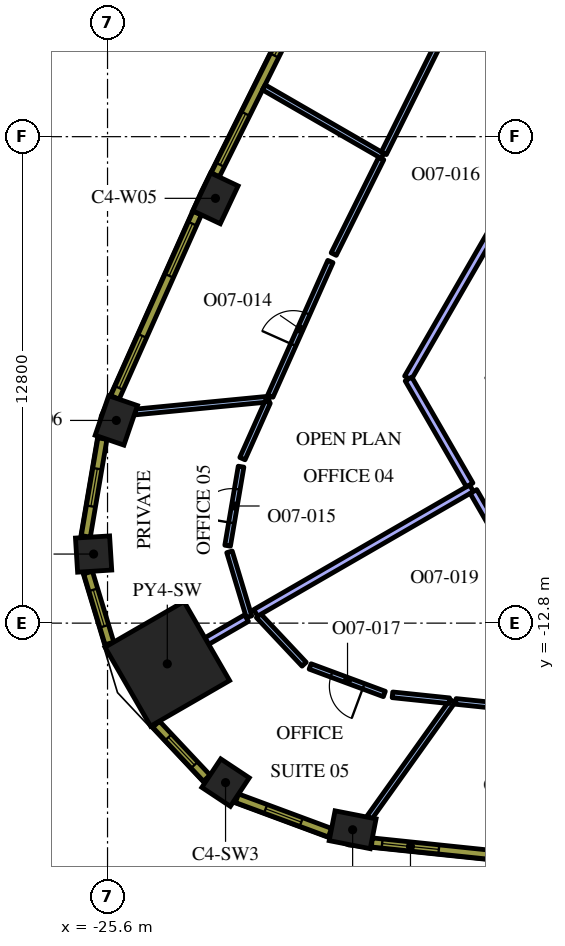
"""IFC4 building model, lengths in metres.
Left out: names, types, materials, properties, quantities, classifications, styles, units other than length and angle.
Written with IfcOpenShell. Run it as: python <this file> out.ifc"""

import sys

from ifc_helpers import new_model, si_unit, direction, frame, frame_2d, origin, origin_2d, place, context, subcontext, project, spatial, rectangle, extrude, element, fill, save


model = new_model("IFC4")
c1 = context("Model", 3, precision=1e-05, world=origin(), true_north=direction((0.0, 1.0)))
c2 = subcontext(c1, "Body", "Model", "MODEL_VIEW")
j1 = project(units=[si_unit("LENGTHUNIT", "METRE"), si_unit("PLANEANGLEUNIT", "RADIAN")], contexts=[c1])
p1 = place(None, origin())
s1 = spatial("IfcSite", under=j1, at=p1, CompositionType="ELEMENT")
p2 = place(p1, origin())
s2 = spatial("IfcBuilding", under=s1, at=p2, CompositionType="ELEMENT")
p3 = place(p2, frame((0.0, 0.0, 222.6)))
s3 = spatial("IfcBuildingStorey", under=s2, at=p3, CompositionType="ELEMENT", Elevation=222.6)
p4 = place(p3, frame((-24.027, -13.872, 0.0), z_axis=(0.0, 0.0, 1.0), x_axis=(-0.866025403784, -0.5, 0.0)))
e1 = element("IfcColumn", 1, at=p4, inside=s3, PredefinedType="COLUMN", context=c2, shape_type="SweptSolid", body=[
    extrude(rectangle(XDim=2.4, YDim=2.4, at=origin_2d()), origin(), (0.0, 0.0, 1.0), 4.2),
])
for number, where, z_axis, x_axis in (
    (2, (-19.15, -18.237, 0.0), (0.0, 0.0, 1.0), (0.981, -0.192, 0.0)),
    (3, (-22.76, -1.623, 0.0), (0.0, 0.0, 1.0), (-0.426, -0.905, 0.0)),
    (4, (-25.369, -7.466, 0.0), (0.0, 0.0, 1.0), (-0.324, -0.946, 0.0)),
):
    element("IfcColumn", number, at=place(p3, frame(where, z_axis=z_axis, x_axis=x_axis)), inside=s3, PredefinedType="COLUMN", context=c2, shape_type="SweptSolid", body=[
        extrude(rectangle(XDim=1.1, YDim=0.8, at=origin_2d()), origin(), (0.0, 0.0, 1.0), 4.2),
    ])
for number, where, z_axis, x_axis in (
    (5, (-25.967, -10.982, 0.0), (0.0, 0.0, 1.0), (0.062, -0.998, 0.0)),
    (6, (-22.494, -16.997, 0.0), (0.0, 0.0, 1.0), (0.833, -0.553, 0.0)),
):
    element("IfcColumn", number, at=place(p3, frame(where, z_axis=z_axis, x_axis=x_axis)), inside=s3, PredefinedType="COLUMN", context=c2, shape_type="SweptSolid", body=[
        extrude(rectangle(XDim=0.9, YDim=0.9, at=origin_2d()), origin(), (0.0, 0.0, 1.0), 4.2),
    ])
p5 = place(p3, frame((-18.363, -0.506, 0.0), z_axis=(0.0, 0.0, 1.0), x_axis=(-0.866048087663, 0.499960708312, 0.0)))
e7 = element("IfcWall", 7, at=p5, inside=s3, PredefinedType="PARTITIONING", context=c2, shape_type="SweptSolid", body=[
    extrude(rectangle(XDim=3.607, YDim=0.15, at=frame_2d((1.804, 0.0))), origin(), (0.0, 0.0, 1.0), 3.45),
])
p6 = place(p3, frame((-16.958, 2.321, 0.0), z_axis=(0.0, 0.0, 1.0), x_axis=(-0.445184199442, -0.895439014432, 0.0)))
e8 = element("IfcWall", 8, at=p6, inside=s3, PredefinedType="PARTITIONING", context=c2, shape_type="SweptSolid", body=[
    extrude(rectangle(XDim=3.082, YDim=0.15, at=frame_2d((1.541, 0.0))), origin(), (0.0, 0.0, 1.0), 3.45),
])
p7 = place(p3, frame((-21.351, -6.904, 0.0), z_axis=(0.0, 0.0, 1.0), x_axis=(-0.995356631468, -0.096255785242, 0.0)))
e9 = element("IfcWall", 9, at=p7, inside=s3, PredefinedType="PARTITIONING", context=c2, shape_type="SweptSolid", body=[
    extrude(rectangle(XDim=3.536, YDim=0.15, at=frame_2d((1.768, 0.0))), origin(), (0.0, 0.0, 1.0), 3.45),
])
p8 = place(p3, frame((-18.397, -0.573, 0.0), z_axis=(0.0, 0.0, 1.0), x_axis=(-0.445162501923, -0.89544980143, 0.0)))
e10 = element("IfcWall", 10, at=p8, inside=s3, PredefinedType="PARTITIONING", context=c2, shape_type="SweptSolid", body=[
    extrude(rectangle(XDim=2.811, YDim=0.15, at=frame_2d((1.405, 0.0))), origin(), (0.0, 0.0, 1.0), 3.45),
])
p9 = place(p3, frame((-21.316, -6.826, 0.0), z_axis=(0.0, 0.0, 1.0), x_axis=(0.407639588163, 0.913142905663, 0.0)))
e11 = element("IfcWall", 11, at=p9, inside=s3, PredefinedType="PARTITIONING", context=c2, shape_type="SweptSolid", body=[
    extrude(rectangle(XDim=3.877, YDim=0.15, at=frame_2d((1.938, 0.0))), origin(), (0.0, 0.0, 1.0), 3.45),
])
p10 = place(p9, frame((1.477, 0.0, 0.0)))
e12 = element("IfcOpeningElement", 12, at=p10, cuts=e11, PredefinedType="OPENING", context=c2, shape_type="SweptSolid", body=[
    extrude(rectangle(XDim=0.9, YDim=2.1, at=frame_2d((0.45, 1.05))), frame((0.0, 0.085, 0.0), z_axis=(0.0, -1.0, 0.0), x_axis=(1.0, 0.0, 0.0)), (0.0, 0.0, 1.0), 0.17),
])
p11 = place(p3, frame((-21.386, -6.983, 0.0), z_axis=(0.0, 0.0, 1.0), x_axis=(-0.407597309494, -0.91316177827, 0.0)))
e13 = element("IfcWall", 13, at=p11, inside=s3, PredefinedType="PARTITIONING", context=c2, shape_type="SweptSolid", body=[
    extrude(rectangle(XDim=1.63, YDim=0.15, at=frame_2d((0.815, 0.0))), origin(), (0.0, 0.0, 1.0), 3.45),
])
p12 = place(p3, frame((-22.44, -10.763, 0.0), z_axis=(0.0, 0.0, 1.0), x_axis=(0.167682096872, 0.985841120257, 0.0)))
e14 = element("IfcWall", 14, at=p12, inside=s3, PredefinedType="PARTITIONING", context=c2, shape_type="SweptSolid", body=[
    extrude(rectangle(XDim=2.11, YDim=0.15, at=frame_2d((1.055, 0.0))), origin(), (0.0, 0.0, 1.0), 3.45),
])
p13 = place(p12, frame((0.61, 0.0, 0.0)))
e15 = element("IfcOpeningElement", 15, at=p13, cuts=e14, PredefinedType="OPENING", context=c2, shape_type="SweptSolid", body=[
    extrude(rectangle(XDim=0.9, YDim=2.1, at=frame_2d((0.45, 1.05))), frame((0.0, 0.085, 0.0), z_axis=(0.0, -1.0, 0.0), x_axis=(1.0, 0.0, 0.0)), (0.0, 0.0, 1.0), 0.17),
])
p14 = place(p3, frame((-22.391, -10.924, 0.0), z_axis=(0.0, 0.0, 1.0), x_axis=(0.288642134652, -0.957437056993, 0.0)))
e16 = element("IfcWall", 16, at=p14, inside=s3, PredefinedType="PARTITIONING", context=c2, shape_type="SweptSolid", body=[
    extrude(rectangle(XDim=1.782, YDim=0.15, at=frame_2d((0.891, 0.0))), origin(), (0.0, 0.0, 1.0), 3.45),
])
p15 = place(p3, frame((-21.943, -12.669, 0.0), z_axis=(0.0, 0.0, 1.0), x_axis=(-0.866030586491, -0.499991023182, 0.0)))
e17 = element("IfcWall", 17, at=p15, inside=s3, PredefinedType="PARTITIONING", context=c2, shape_type="SweptSolid", body=[
    extrude(rectangle(XDim=1.207, YDim=0.2, at=frame_2d((0.603, 0.0))), origin(), (0.0, 0.0, 1.0), 3.45),
])
p16 = place(p3, frame((-16.021, -9.25, 0.0), z_axis=(0.0, 0.0, 1.0), x_axis=(-0.866021955858, -0.500005971936, 0.0)))
e18 = element("IfcWall", 18, at=p16, inside=s3, PredefinedType="PARTITIONING", context=c2, shape_type="SweptSolid", body=[
    extrude(rectangle(XDim=6.56, YDim=0.2, at=frame_2d((3.28, 0.0))), origin(), (0.0, 0.0, 1.0), 3.45),
])
p17 = place(p3, frame((-12.537, 2.585, 0.0), z_axis=(0.0, 0.0, 1.0), x_axis=(-0.500002393198, -0.866024022066, 0.0)))
e19 = element("IfcWall", 19, at=p17, inside=s3, PredefinedType="PARTITIONING", context=c2, shape_type="SweptSolid", body=[
    extrude(rectangle(XDim=10.317, YDim=0.2, at=frame_2d((5.159, 0.0))), origin(), (0.0, 0.0, 1.0), 3.45),
])
p18 = place(p17, frame((4.7, 0.0, 0.0)))
e20 = element("IfcOpeningElement", 20, at=p18, cuts=e19, PredefinedType="OPENING", context=c2, shape_type="SweptSolid", body=[
    extrude(rectangle(XDim=1.0, YDim=2.1, at=frame_2d((0.5, 1.05))), frame((0.0, 0.11, 0.0), z_axis=(0.0, -1.0, 0.0), x_axis=(1.0, 0.0, 0.0)), (0.0, 0.0, 1.0), 0.22),
])
p19 = place(p3, frame((-17.681, -6.376, 0.0), z_axis=(0.0, 0.0, 1.0), x_axis=(0.500022299258, -0.866012528919, 0.0)))
e21 = element("IfcWall", 21, at=p19, inside=s3, PredefinedType="PARTITIONING", context=c2, shape_type="SweptSolid", body=[
    extrude(rectangle(XDim=3.219, YDim=0.2, at=frame_2d((1.609, 0.0))), origin(), (0.0, 0.0, 1.0), 3.45),
])
p20 = place(p3, frame((-16.521, -14.851, 0.0), z_axis=(0.0, 0.0, 1.0), x_axis=(-0.58104805465, -0.813869251285, 0.0)))
e22 = element("IfcWall", 22, at=p20, inside=s3, PredefinedType="PARTITIONING", context=c2, shape_type="SweptSolid", body=[
    extrude(rectangle(XDim=3.766, YDim=0.15, at=frame_2d((1.883, 0.0))), origin(), (0.0, 0.0, 1.0), 3.45),
])
p21 = place(p3, frame((-21.628, -12.603, 0.0), z_axis=(0.0, 0.0, 1.0), x_axis=(0.684778496912, -0.728751267695, 0.0)))
e23 = element("IfcWall", 23, at=p21, inside=s3, PredefinedType="PARTITIONING", context=c2, shape_type="SweptSolid", body=[
    extrude(rectangle(XDim=1.754, YDim=0.15, at=frame_2d((0.877, 0.0))), origin(), (0.0, 0.0, 1.0), 3.45),
])
p22 = place(p3, frame((-18.316, -14.664, 0.0), z_axis=(0.0, 0.0, 1.0), x_axis=(-0.937594570401, 0.347730386297, 0.0)))
e24 = element("IfcWall", 24, at=p22, inside=s3, PredefinedType="PARTITIONING", context=c2, shape_type="SweptSolid", body=[
    extrude(rectangle(XDim=2.083, YDim=0.15, at=frame_2d((1.042, 0.0))), origin(), (0.0, 0.0, 1.0), 3.45),
])
p23 = place(p22, frame((0.583, 0.0, 0.0)))
e25 = element("IfcOpeningElement", 25, at=p23, cuts=e24, PredefinedType="OPENING", context=c2, shape_type="SweptSolid", body=[
    extrude(rectangle(XDim=0.9, YDim=2.1, at=frame_2d((0.45, 1.05))), frame((0.0, 0.085, 0.0), z_axis=(0.0, -1.0, 0.0), x_axis=(1.0, 0.0, 0.0)), (0.0, 0.0, 1.0), 0.17),
])
p24 = place(p3, frame((-18.103, -14.686, 0.0), z_axis=(0.0, 0.0, 1.0), x_axis=(0.994622241781, -0.103569281909, 0.0)))
e26 = element("IfcWall", 26, at=p24, inside=s3, PredefinedType="PARTITIONING", context=c2, shape_type="SweptSolid", body=[
    extrude(rectangle(XDim=1.504, YDim=0.15, at=frame_2d((0.752, 0.0))), origin(), (0.0, 0.0, 1.0), 3.45),
])
p25 = place(p3, frame((-12.823, -15.236, 0.0), z_axis=(0.0, 0.0, 1.0), x_axis=(-0.994621582944, 0.10357560882, 0.0)))
e27 = element("IfcWall", 27, at=p25, inside=s3, PredefinedType="PARTITIONING", context=c2, shape_type="SweptSolid", body=[
    extrude(rectangle(XDim=3.632, YDim=0.15, at=frame_2d((1.816, 0.0))), origin(), (0.0, 0.0, 1.0), 3.45),
])
p26 = place(p25, frame((1.332, 0.0, 0.0)))
e28 = element("IfcOpeningElement", 28, at=p26, cuts=e27, PredefinedType="OPENING", context=c2, shape_type="SweptSolid", body=[
    extrude(rectangle(XDim=0.9, YDim=2.1, at=frame_2d((0.45, 1.05))), frame((0.0, 0.085, 0.0), z_axis=(0.0, -1.0, 0.0), x_axis=(1.0, 0.0, 0.0)), (0.0, 0.0, 1.0), 0.17),
])
p27 = place(p3, frame((-15.971, -9.337, 0.0), z_axis=(0.0, 0.0, 1.0), x_axis=(0.500010870188, -0.866019127788, 0.0)))
e29 = element("IfcWall", 29, at=p27, inside=s3, PredefinedType="PARTITIONING", context=c2, shape_type="SweptSolid", body=[
    extrude(rectangle(XDim=3.249, YDim=0.2, at=frame_2d((1.624, 0.0))), origin(), (0.0, 0.0, 1.0), 3.45),
])
p28 = place(p27, frame((1.1, 0.0, 0.0)))
e30 = element("IfcOpeningElement", 30, at=p28, cuts=e29, PredefinedType="OPENING", context=c2, shape_type="SweptSolid", body=[
    extrude(rectangle(XDim=1.0, YDim=2.1, at=frame_2d((0.5, 1.05))), frame((0.0, 0.11, 0.0), z_axis=(0.0, -1.0, 0.0), x_axis=(1.0, 0.0, 0.0)), (0.0, 0.0, 1.0), 0.22),
])
p29 = place(p3, frame((-18.644, -18.571, 0.0), z_axis=(0.0, 0.0, 1.0), x_axis=(0.994621961215, -0.103571976272, 0.0)))
e31 = element("IfcWall", 31, at=p29, inside=s3, PredefinedType="SOLIDWALL", context=c2, shape_type="SweptSolid", body=[
    extrude(rectangle(XDim=5.311, YDim=0.24, at=frame_2d((2.655, 0.0))), origin(), (0.0, 0.0, 1.0), 3.95),
])
p30 = place(p29, frame((0.271, 0.0, 0.9)))
e32 = element("IfcOpeningElement", 32, at=p30, cuts=e31, PredefinedType="OPENING", context=c2, shape_type="SweptSolid", body=[
    extrude(rectangle(XDim=1.5, YDim=2.55, at=frame_2d((0.75, 1.275))), frame((0.0, 0.13, 0.0), z_axis=(0.0, -1.0, 0.0), x_axis=(1.0, 0.0, 0.0)), (0.0, 0.0, 1.0), 0.26),
])
p31 = place(p29, frame((3.504, 0.0, 0.9)))
e33 = element("IfcOpeningElement", 33, at=p31, cuts=e31, PredefinedType="OPENING", context=c2, shape_type="SweptSolid", body=[
    extrude(rectangle(XDim=1.5, YDim=2.55, at=frame_2d((0.75, 1.275))), frame((0.0, 0.13, 0.0), z_axis=(0.0, -1.0, 0.0), x_axis=(1.0, 0.0, 0.0)), (0.0, 0.0, 1.0), 0.26),
])
p32 = place(p3, frame((-20.407, 3.74, 0.0), z_axis=(0.0, 0.0, 1.0), x_axis=(-0.445129582031, -0.895466166419, 0.0)))
e34 = element("IfcWall", 34, at=p32, inside=s3, PredefinedType="SOLIDWALL", context=c2, shape_type="SweptSolid", body=[
    extrude(rectangle(XDim=5.298, YDim=0.24, at=frame_2d((2.649, 0.0))), origin(), (0.0, 0.0, 1.0), 3.95),
])
p33 = place(p32, frame((0.295, 0.0, 0.9)))
e35 = element("IfcOpeningElement", 35, at=p33, cuts=e34, PredefinedType="OPENING", context=c2, shape_type="SweptSolid", body=[
    extrude(rectangle(XDim=1.5, YDim=2.55, at=frame_2d((0.75, 1.275))), frame((0.0, 0.13, 0.0), z_axis=(0.0, -1.0, 0.0), x_axis=(1.0, 0.0, 0.0)), (0.0, 0.0, 1.0), 0.26),
])
p34 = place(p32, frame((3.504, 0.0, 0.9)))
e36 = element("IfcOpeningElement", 36, at=p34, cuts=e34, PredefinedType="OPENING", context=c2, shape_type="SweptSolid", body=[
    extrude(rectangle(XDim=1.5, YDim=2.55, at=frame_2d((0.75, 1.275))), frame((0.0, 0.13, 0.0), z_axis=(0.0, -1.0, 0.0), x_axis=(1.0, 0.0, 0.0)), (0.0, 0.0, 1.0), 0.26),
])
p35 = place(p3, frame((-23.24, -2.011, 0.0), z_axis=(0.0, 0.0, 1.0), x_axis=(-0.407579651789, -0.913169659728, 0.0)))
e37 = element("IfcWall", 37, at=p35, inside=s3, PredefinedType="SOLIDWALL", context=c2, shape_type="SweptSolid", body=[
    extrude(rectangle(XDim=5.311, YDim=0.24, at=frame_2d((2.655, 0.0))), origin(), (0.0, 0.0, 1.0), 3.95),
])
p36 = place(p35, frame((0.306, 0.0, 0.9)))
e38 = element("IfcOpeningElement", 38, at=p36, cuts=e37, PredefinedType="OPENING", context=c2, shape_type="SweptSolid", body=[
    extrude(rectangle(XDim=1.5, YDim=2.55, at=frame_2d((0.75, 1.275))), frame((0.0, 0.13, 0.0), z_axis=(0.0, -1.0, 0.0), x_axis=(1.0, 0.0, 0.0)), (0.0, 0.0, 1.0), 0.26),
])
p37 = place(p35, frame((3.539, 0.0, 0.9)))
e39 = element("IfcOpeningElement", 39, at=p37, cuts=e37, PredefinedType="OPENING", context=c2, shape_type="SweptSolid", body=[
    extrude(rectangle(XDim=1.5, YDim=2.55, at=frame_2d((0.75, 1.275))), frame((0.0, 0.13, 0.0), z_axis=(0.0, -1.0, 0.0), x_axis=(1.0, 0.0, 0.0)), (0.0, 0.0, 1.0), 0.26),
])
p38 = place(p3, frame((-25.734, -7.945, 0.0), z_axis=(0.0, 0.0, 1.0), x_axis=(-0.167660055546, -0.985844869021, 0.0)))
e40 = element("IfcWall", 40, at=p38, inside=s3, PredefinedType="SOLIDWALL", context=c2, shape_type="SweptSolid", body=[
    extrude(rectangle(XDim=2.609, YDim=0.24, at=frame_2d((1.305, 0.0))), origin(), (0.0, 0.0, 1.0), 3.95),
])
p39 = place(p38, frame((0.805, 0.0, 0.9)))
e41 = element("IfcOpeningElement", 41, at=p39, cuts=e40, PredefinedType="OPENING", context=c2, shape_type="SweptSolid", body=[
    extrude(rectangle(XDim=1.0, YDim=2.55, at=frame_2d((0.5, 1.275))), frame((0.0, 0.13, 0.0), z_axis=(0.0, -1.0, 0.0), x_axis=(1.0, 0.0, 0.0)), (0.0, 0.0, 1.0), 0.26),
])
p40 = place(p3, frame((-26.112, -11.469, 0.0), z_axis=(0.0, 0.0, 1.0), x_axis=(0.288727209095, -0.957411405159, 0.0)))
e42 = element("IfcWall", 42, at=p40, inside=s3, PredefinedType="SOLIDWALL", context=c2, shape_type="SweptSolid", body=[
    extrude(rectangle(XDim=1.948, YDim=0.24, at=frame_2d((0.974, 0.0))), origin(), (0.0, 0.0, 1.0), 3.95),
])
p41 = place(p40, frame((0.474, 0.0, 0.9)))
e43 = element("IfcOpeningElement", 43, at=p41, cuts=e42, PredefinedType="OPENING", context=c2, shape_type="SweptSolid", body=[
    extrude(rectangle(XDim=1.0, YDim=2.55, at=frame_2d((0.5, 1.275))), frame((0.0, 0.13, 0.0), z_axis=(0.0, -1.0, 0.0), x_axis=(1.0, 0.0, 0.0)), (0.0, 0.0, 1.0), 0.26),
])
p42 = place(p3, frame((-24.323, -15.459, 0.0), z_axis=(0.0, 0.0, 1.0), x_axis=(0.684770274166, -0.728758994194, 0.0)))
e44 = element("IfcWall", 44, at=p42, inside=s3, PredefinedType="SOLIDWALL", context=c2, shape_type="SweptSolid", body=[
    extrude(rectangle(XDim=1.948, YDim=0.24, at=frame_2d((0.974, 0.0))), origin(), (0.0, 0.0, 1.0), 3.95),
])
p43 = place(p42, frame((0.474, 0.0, 0.9)))
e45 = element("IfcOpeningElement", 45, at=p43, cuts=e44, PredefinedType="OPENING", context=c2, shape_type="SweptSolid", body=[
    extrude(rectangle(XDim=1.0, YDim=2.55, at=frame_2d((0.5, 1.275))), frame((0.0, 0.13, 0.0), z_axis=(0.0, -1.0, 0.0), x_axis=(1.0, 0.0, 0.0)), (0.0, 0.0, 1.0), 0.26),
])
p44 = place(p3, frame((-22.194, -17.406, 0.0), z_axis=(0.0, 0.0, 1.0), x_axis=(0.937569171184, -0.347798863203, 0.0)))
e46 = element("IfcWall", 46, at=p44, inside=s3, PredefinedType="SOLIDWALL", context=c2, shape_type="SweptSolid", body=[
    extrude(rectangle(XDim=2.609, YDim=0.24, at=frame_2d((1.305, 0.0))), origin(), (0.0, 0.0, 1.0), 3.95),
])
p45 = place(p44, frame((0.805, 0.0, 0.9)))
e47 = element("IfcOpeningElement", 47, at=p45, cuts=e46, PredefinedType="OPENING", context=c2, shape_type="SweptSolid", body=[
    extrude(rectangle(XDim=1.0, YDim=2.55, at=frame_2d((0.5, 1.275))), frame((0.0, 0.13, 0.0), z_axis=(0.0, -1.0, 0.0), x_axis=(1.0, 0.0, 0.0)), (0.0, 0.0, 1.0), 0.26),
])
p46 = place(p10, origin())
e48 = element("IfcDoor", 48, at=p46, inside=s3, OperationType="SINGLE_SWING_LEFT", PredefinedType="DOOR", context=c2, shape_type="SweptSolid", body=[
    extrude(rectangle(XDim=0.9, YDim=2.1, at=frame_2d((0.45, 1.05))), frame((0.0, 0.025, 0.0), z_axis=(0.0, -1.0, 0.0), x_axis=(1.0, 0.0, 0.0)), (0.0, 0.0, 1.0), 0.05),
])
fill(e12, e48)
p47 = place(p13, origin())
e49 = element("IfcDoor", 49, at=p47, inside=s3, OperationType="SINGLE_SWING_RIGHT", PredefinedType="DOOR", context=c2, shape_type="SweptSolid", body=[
    extrude(rectangle(XDim=0.9, YDim=2.1, at=frame_2d((0.45, 1.05))), frame((0.0, 0.025, 0.0), z_axis=(0.0, -1.0, 0.0), x_axis=(1.0, 0.0, 0.0)), (0.0, 0.0, 1.0), 0.05),
])
fill(e15, e49)
p48 = place(p23, origin())
e50 = element("IfcDoor", 50, at=p48, inside=s3, OperationType="SINGLE_SWING_LEFT", PredefinedType="DOOR", context=c2, shape_type="SweptSolid", body=[
    extrude(rectangle(XDim=0.9, YDim=2.1, at=frame_2d((0.45, 1.05))), frame((0.0, 0.025, 0.0), z_axis=(0.0, -1.0, 0.0), x_axis=(1.0, 0.0, 0.0)), (0.0, 0.0, 1.0), 0.05),
])
fill(e25, e50)
p49 = place(p30, origin())
e51 = element("IfcWindow", 51, at=p49, inside=s3, PartitioningType="SINGLE_PANEL", PredefinedType="WINDOW", context=c2, shape_type="SweptSolid", body=[
    extrude(rectangle(XDim=1.5, YDim=2.55, at=frame_2d((0.75, 1.275))), frame((0.0, 0.04, 0.0), z_axis=(0.0, -1.0, 0.0), x_axis=(1.0, 0.0, 0.0)), (0.0, 0.0, 1.0), 0.06),
])
fill(e32, e51)
p50 = place(p33, origin())
e52 = element("IfcWindow", 52, at=p50, inside=s3, PartitioningType="SINGLE_PANEL", PredefinedType="WINDOW", context=c2, shape_type="SweptSolid", body=[
    extrude(rectangle(XDim=1.5, YDim=2.55, at=frame_2d((0.75, 1.275))), frame((0.0, 0.04, 0.0), z_axis=(0.0, -1.0, 0.0), x_axis=(1.0, 0.0, 0.0)), (0.0, 0.0, 1.0), 0.06),
])
fill(e35, e52)
p51 = place(p34, origin())
e53 = element("IfcWindow", 53, at=p51, inside=s3, PartitioningType="SINGLE_PANEL", PredefinedType="WINDOW", context=c2, shape_type="SweptSolid", body=[
    extrude(rectangle(XDim=1.5, YDim=2.55, at=frame_2d((0.75, 1.275))), frame((0.0, 0.04, 0.0), z_axis=(0.0, -1.0, 0.0), x_axis=(1.0, 0.0, 0.0)), (0.0, 0.0, 1.0), 0.06),
])
fill(e36, e53)
p52 = place(p36, origin())
e54 = element("IfcWindow", 54, at=p52, inside=s3, PartitioningType="SINGLE_PANEL", PredefinedType="WINDOW", context=c2, shape_type="SweptSolid", body=[
    extrude(rectangle(XDim=1.5, YDim=2.55, at=frame_2d((0.75, 1.275))), frame((0.0, 0.04, 0.0), z_axis=(0.0, -1.0, 0.0), x_axis=(1.0, 0.0, 0.0)), (0.0, 0.0, 1.0), 0.06),
])
fill(e38, e54)
p53 = place(p37, origin())
e55 = element("IfcWindow", 55, at=p53, inside=s3, PartitioningType="SINGLE_PANEL", PredefinedType="WINDOW", context=c2, shape_type="SweptSolid", body=[
    extrude(rectangle(XDim=1.5, YDim=2.55, at=frame_2d((0.75, 1.275))), frame((0.0, 0.04, 0.0), z_axis=(0.0, -1.0, 0.0), x_axis=(1.0, 0.0, 0.0)), (0.0, 0.0, 1.0), 0.06),
])
fill(e39, e55)
p54 = place(p39, origin())
e56 = element("IfcWindow", 56, at=p54, inside=s3, PartitioningType="SINGLE_PANEL", PredefinedType="WINDOW", context=c2, shape_type="SweptSolid", body=[
    extrude(rectangle(XDim=1.0, YDim=2.55, at=frame_2d((0.5, 1.275))), frame((0.0, 0.04, 0.0), z_axis=(0.0, -1.0, 0.0), x_axis=(1.0, 0.0, 0.0)), (0.0, 0.0, 1.0), 0.06),
])
fill(e41, e56)
p55 = place(p41, origin())
e57 = element("IfcWindow", 57, at=p55, inside=s3, PartitioningType="SINGLE_PANEL", PredefinedType="WINDOW", context=c2, shape_type="SweptSolid", body=[
    extrude(rectangle(XDim=1.0, YDim=2.55, at=frame_2d((0.5, 1.275))), frame((0.0, 0.04, 0.0), z_axis=(0.0, -1.0, 0.0), x_axis=(1.0, 0.0, 0.0)), (0.0, 0.0, 1.0), 0.06),
])
fill(e43, e57)
p56 = place(p43, origin())
e58 = element("IfcWindow", 58, at=p56, inside=s3, PartitioningType="SINGLE_PANEL", PredefinedType="WINDOW", context=c2, shape_type="SweptSolid", body=[
    extrude(rectangle(XDim=1.0, YDim=2.55, at=frame_2d((0.5, 1.275))), frame((0.0, 0.04, 0.0), z_axis=(0.0, -1.0, 0.0), x_axis=(1.0, 0.0, 0.0)), (0.0, 0.0, 1.0), 0.06),
])
fill(e45, e58)
p57 = place(p45, origin())
e59 = element("IfcWindow", 59, at=p57, inside=s3, PartitioningType="SINGLE_PANEL", PredefinedType="WINDOW", context=c2, shape_type="SweptSolid", body=[
    extrude(rectangle(XDim=1.0, YDim=2.55, at=frame_2d((0.5, 1.275))), frame((0.0, 0.04, 0.0), z_axis=(0.0, -1.0, 0.0), x_axis=(1.0, 0.0, 0.0)), (0.0, 0.0, 1.0), 0.06),
])
fill(e47, e59)
save(model, sys.argv[1])
